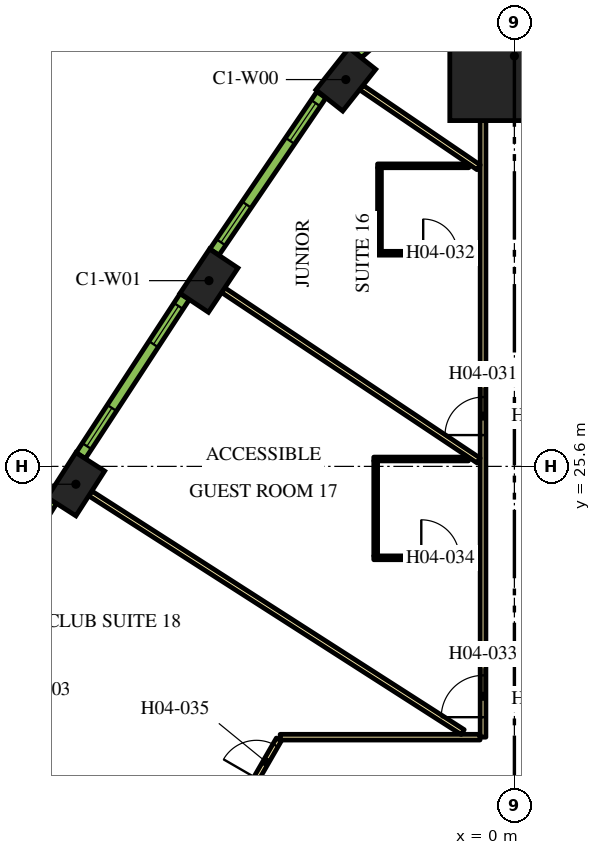
"""IFC4 building model, lengths in metres.
Left out: names, types, materials, properties, quantities, classifications, styles, units other than length and angle.
Written with IfcOpenShell. Run it as: python <this file> out.ifc"""

import sys

from ifc_helpers import new_model, si_unit, direction, frame, frame_2d, origin, origin_2d, place, context, subcontext, project, spatial, rectangle, extrude, element, fill, save


model = new_model("IFC4")
c1 = context("Model", 3, precision=1e-05, world=origin(), true_north=direction((0.0, 1.0)))
c2 = subcontext(c1, "Body", "Model", "MODEL_VIEW")
j1 = project(units=[si_unit("LENGTHUNIT", "METRE"), si_unit("PLANEANGLEUNIT", "RADIAN")], contexts=[c1])
p1 = place(None, origin())
s1 = spatial("IfcSite", under=j1, at=p1, CompositionType="ELEMENT")
p2 = place(p1, origin())
s2 = spatial("IfcBuilding", under=s1, at=p2, CompositionType="ELEMENT")
p3 = place(p2, frame((0.0, 0.0, 70.5)))
s3 = spatial("IfcBuildingStorey", under=s2, at=p3, CompositionType="ELEMENT", Elevation=70.5)
p4 = place(p3, frame((0.0, 36.399, 0.0), z_axis=(0.0, 0.0, 1.0), x_axis=(0.0, 1.0, 0.0)))
e1 = element("IfcColumn", 1, at=p4, inside=s3, PredefinedType="COLUMN", context=c2, shape_type="SweptSolid", body=[
    extrude(rectangle(XDim=3.4, YDim=3.4, at=origin_2d()), origin(), (0.0, 0.0, 1.0), 3.9),
])
for number, where, z_axis, x_axis in (
    (2, (-4.436, 35.778, 0.0), (0.0, 0.0, 1.0), (-0.62, -0.784, 0.0)),
    (3, (-8.037, 30.487, 0.0), (0.0, 0.0, 1.0), (-0.555, -0.832, 0.0)),
    (4, (-11.539, 25.131, 0.0), (0.0, 0.0, 1.0), (-0.539, -0.842, 0.0)),
):
    element("IfcColumn", number, at=place(p3, frame(where, z_axis=z_axis, x_axis=x_axis)), inside=s3, PredefinedType="COLUMN", context=c2, shape_type="SweptSolid", body=[
        extrude(rectangle(XDim=1.4, YDim=0.9, at=origin_2d()), origin(), (0.0, 0.0, 1.0), 3.9),
    ])
p5 = place(p3, frame((-0.825, 18.475, 0.0), z_axis=(0.0, 0.0, 1.0), x_axis=(0.0, 1.0, 0.0)))
e5 = element("IfcWall", 5, at=p5, inside=s3, PredefinedType="PARTITIONING", context=c2, shape_type="SweptSolid", body=[
    extrude(rectangle(XDim=16.224, YDim=0.15, at=frame_2d((8.112, 0.0))), origin(), (0.0, 0.0, 1.0), 2.75),
])
p6 = place(p5, frame((7.949, 0.0, 0.0)))
e6 = element("IfcOpeningElement", 6, at=p6, cuts=e5, PredefinedType="OPENING", context=c2, shape_type="SweptSolid", body=[
    extrude(rectangle(XDim=1.0, YDim=2.1, at=frame_2d((0.5, 1.05))), frame((0.0, 0.085, 0.0), z_axis=(0.0, -1.0, 0.0), x_axis=(1.0, 0.0, 0.0)), (0.0, 0.0, 1.0), 0.17),
])
p7 = place(p5, frame((0.526, 0.0, 0.0)))
e7 = element("IfcOpeningElement", 7, at=p7, cuts=e5, PredefinedType="OPENING", context=c2, shape_type="SweptSolid", body=[
    extrude(rectangle(XDim=1.1, YDim=2.1, at=frame_2d((0.55, 1.05))), frame((0.0, 0.085, 0.0), z_axis=(0.0, -1.0, 0.0), x_axis=(1.0, 0.0, 0.0)), (0.0, 0.0, 1.0), 0.17),
])
p8 = place(p3, frame((-6.163, 18.475, 0.0), z_axis=(0.0, 0.0, 1.0), x_axis=(1.0, 0.0, 0.0)))
e8 = element("IfcWall", 8, at=p8, inside=s3, PredefinedType="PARTITIONING", context=c2, shape_type="SweptSolid", body=[
    extrude(rectangle(XDim=5.258, YDim=0.15, at=frame_2d((2.629, 0.0))), origin(), (0.0, 0.0, 1.0), 2.75),
])
p9 = place(p3, frame((-19.081, -3.9, 0.0), z_axis=(0.0, 0.0, 1.0), x_axis=(0.499998313975, 0.866026377209, 0.0)))
e9 = element("IfcWall", 9, at=p9, inside=s3, PredefinedType="PARTITIONING", context=c2, shape_type="SweptSolid", body=[
    extrude(rectangle(XDim=25.766, YDim=0.15, at=frame_2d((12.883, 0.0))), origin(), (0.0, 0.0, 1.0), 2.75),
])
p10 = place(p9, frame((24.586, 0.0, 0.0)))
e10 = element("IfcOpeningElement", 10, at=p10, cuts=e9, PredefinedType="OPENING", context=c2, shape_type="SweptSolid", body=[
    extrude(rectangle(XDim=1.0, YDim=2.1, at=frame_2d((0.5, 1.05))), frame((0.0, 0.085, 0.0), z_axis=(0.0, -1.0, 0.0), x_axis=(1.0, 0.0, 0.0)), (0.0, 0.0, 1.0), 0.17),
])
p11 = place(p9, frame((9.948, 0.0, 0.0)))
e11 = element("IfcOpeningElement", 11, at=p11, cuts=e9, PredefinedType="OPENING", context=c2, shape_type="SweptSolid", body=[
    extrude(rectangle(XDim=1.0, YDim=2.1, at=frame_2d((0.5, 1.05))), frame((0.0, 0.085, 0.0), z_axis=(0.0, -1.0, 0.0), x_axis=(1.0, 0.0, 0.0)), (0.0, 0.0, 1.0), 0.17),
])
p12 = place(p9, frame((7.782, 0.0, 0.0)))
e12 = element("IfcOpeningElement", 12, at=p12, cuts=e9, PredefinedType="OPENING", context=c2, shape_type="SweptSolid", body=[
    extrude(rectangle(XDim=0.9, YDim=2.1, at=frame_2d((0.45, 1.05))), frame((0.0, 0.085, 0.0), z_axis=(0.0, -1.0, 0.0), x_axis=(1.0, 0.0, 0.0)), (0.0, 0.0, 1.0), 0.17),
])
p13 = place(p9, frame((4.658, 0.0, 0.0)))
e13 = element("IfcOpeningElement", 13, at=p13, cuts=e9, PredefinedType="OPENING", context=c2, shape_type="SweptSolid", body=[
    extrude(rectangle(XDim=0.9, YDim=2.1, at=frame_2d((0.45, 1.05))), frame((0.0, 0.085, 0.0), z_axis=(0.0, -1.0, 0.0), x_axis=(1.0, 0.0, 0.0)), (0.0, 0.0, 1.0), 0.17),
])
p14 = place(p3, frame((-11.16, 24.888, 0.0), z_axis=(0.0, 0.0, 1.0), x_axis=(0.84199813156, -0.539480441211, 0.0)))
e14 = element("IfcWall", 14, at=p14, inside=s3, PredefinedType="PARTITIONING", context=c2, shape_type="SweptSolid", body=[
    extrude(rectangle(XDim=11.638, YDim=0.15, at=frame_2d((5.819, 0.0))), origin(), (0.0, 0.0, 1.0), 2.75),
])
p15 = place(p3, frame((-7.662, 30.238, 0.0), z_axis=(0.0, 0.0, 1.0), x_axis=(0.831882886825, -0.554951225431, 0.0)))
e15 = element("IfcWall", 15, at=p15, inside=s3, PredefinedType="PARTITIONING", context=c2, shape_type="SweptSolid", body=[
    extrude(rectangle(XDim=8.079, YDim=0.15, at=frame_2d((4.04, 0.0))), origin(), (0.0, 0.0, 1.0), 2.75),
])
p16 = place(p3, frame((-4.028, 35.569, 0.0), z_axis=(0.0, 0.0, 1.0), x_axis=(0.826730622998, -0.562597971021, 0.0)))
e16 = element("IfcWall", 16, at=p16, inside=s3, PredefinedType="PARTITIONING", context=c2, shape_type="SweptSolid", body=[
    extrude(rectangle(XDim=3.733, YDim=0.15, at=frame_2d((1.867, 0.0))), origin(), (0.0, 0.0, 1.0), 2.75),
])
p17 = place(p3, frame((-3.6, 31.208, 0.0), z_axis=(0.0, 0.0, 1.0), x_axis=(1.0, 0.0, 0.0)))
e17 = element("IfcWall", 17, at=p17, inside=s3, PredefinedType="PARTITIONING", context=c2, shape_type="SweptSolid", body=[
    extrude(rectangle(XDim=2.7, YDim=0.1, at=frame_2d((1.35, 0.0))), origin(), (0.0, 0.0, 1.0), 2.75),
])
p18 = place(p17, frame((1.2, 0.0, 0.0)))
e18 = element("IfcOpeningElement", 18, at=p18, cuts=e17, PredefinedType="OPENING", context=c2, shape_type="SweptSolid", body=[
    extrude(rectangle(XDim=0.9, YDim=2.1, at=frame_2d((0.45, 1.05))), frame((0.0, 0.06, 0.0), z_axis=(0.0, -1.0, 0.0), x_axis=(1.0, 0.0, 0.0)), (0.0, 0.0, 1.0), 0.12),
])
p19 = place(p3, frame((-3.55, 31.259, 0.0), z_axis=(0.0, 0.0, 1.0), x_axis=(0.0, 1.0, 0.0)))
e19 = element("IfcWall", 19, at=p19, inside=s3, PredefinedType="PARTITIONING", context=c2, shape_type="SweptSolid", body=[
    extrude(rectangle(XDim=2.2, YDim=0.1, at=frame_2d((1.1, 0.0))), origin(), (0.0, 0.0, 1.0), 2.75),
])
p20 = place(p3, frame((-1.2, 33.509, 0.0), z_axis=(0.0, 0.0, 1.0), x_axis=(-1.0, 0.0, 0.0)))
e20 = element("IfcWall", 20, at=p20, inside=s3, PredefinedType="PARTITIONING", context=c2, shape_type="SweptSolid", body=[
    extrude(rectangle(XDim=2.4, YDim=0.1, at=frame_2d((1.2, 0.0))), origin(), (0.0, 0.0, 1.0), 2.75),
])
p21 = place(p3, frame((-3.7, 23.195, 0.0), z_axis=(0.0, 0.0, 1.0), x_axis=(1.0, 0.0, 0.0)))
e21 = element("IfcWall", 21, at=p21, inside=s3, PredefinedType="PARTITIONING", context=c2, shape_type="SweptSolid", body=[
    extrude(rectangle(XDim=2.8, YDim=0.1, at=frame_2d((1.4, 0.0))), origin(), (0.0, 0.0, 1.0), 2.75),
])
p22 = place(p21, frame((1.25, 0.0, 0.0)))
e22 = element("IfcOpeningElement", 22, at=p22, cuts=e21, PredefinedType="OPENING", context=c2, shape_type="SweptSolid", body=[
    extrude(rectangle(XDim=1.0, YDim=2.1, at=frame_2d((0.5, 1.05))), frame((0.0, 0.06, 0.0), z_axis=(0.0, -1.0, 0.0), x_axis=(1.0, 0.0, 0.0)), (0.0, 0.0, 1.0), 0.12),
])
p23 = place(p3, frame((-3.65, 23.245, 0.0), z_axis=(0.0, 0.0, 1.0), x_axis=(0.0, 1.0, 0.0)))
e23 = element("IfcWall", 23, at=p23, inside=s3, PredefinedType="PARTITIONING", context=c2, shape_type="SweptSolid", body=[
    extrude(rectangle(XDim=2.5, YDim=0.1, at=frame_2d((1.25, 0.0))), origin(), (0.0, 0.0, 1.0), 2.75),
])
p24 = place(p3, frame((-1.21, 25.795, 0.0), z_axis=(0.0, 0.0, 1.0), x_axis=(-1.0, 0.0, 0.0)))
e24 = element("IfcWall", 24, at=p24, inside=s3, PredefinedType="PARTITIONING", context=c2, shape_type="SweptSolid", body=[
    extrude(rectangle(XDim=2.49, YDim=0.1, at=frame_2d((1.245, 0.0))), origin(), (0.0, 0.0, 1.0), 2.75),
])
p25 = place(p3, frame((-3.064, 37.395, 0.0), z_axis=(0.0, 0.0, 1.0), x_axis=(-0.749812680302, -0.661650167731, 0.0)))
e25 = element("IfcWall", 25, at=p25, inside=s3, PredefinedType="SOLIDWALL", context=c2, shape_type="SweptSolid", body=[
    extrude(rectangle(XDim=1.415, YDim=0.29, at=frame_2d((0.708, 0.0))), origin(), (0.0, 0.0, 1.0), 3.65),
])
p26 = place(p25, frame((0.258, 0.0, 0.9)))
e26 = element("IfcOpeningElement", 26, at=p26, cuts=e25, PredefinedType="OPENING", context=c2, shape_type="SweptSolid", body=[
    extrude(rectangle(XDim=0.9, YDim=2.15, at=frame_2d((0.45, 1.075))), frame((0.0, 0.155, 0.0), z_axis=(0.0, -1.0, 0.0), x_axis=(1.0, 0.0, 0.0)), (0.0, 0.0, 1.0), 0.31),
])
p27 = place(p3, frame((-5.078, 35.376, 0.0), z_axis=(0.0, 0.0, 1.0), x_axis=(-0.562610153679, -0.826722332454, 0.0)))
e27 = element("IfcWall", 27, at=p27, inside=s3, PredefinedType="SOLIDWALL", context=c2, shape_type="SweptSolid", body=[
    extrude(rectangle(XDim=5.006, YDim=0.29, at=frame_2d((2.503, 0.0))), origin(), (0.0, 0.0, 1.0), 3.65),
])
p28 = place(p27, frame((0.265, 0.0, 0.9)))
e28 = element("IfcOpeningElement", 28, at=p28, cuts=e27, PredefinedType="OPENING", context=c2, shape_type="SweptSolid", body=[
    extrude(rectangle(XDim=1.2, YDim=2.15, at=frame_2d((0.6, 1.075))), frame((0.0, 0.155, 0.0), z_axis=(0.0, -1.0, 0.0), x_axis=(1.0, 0.0, 0.0)), (0.0, 0.0, 1.0), 0.31),
])
p29 = place(p27, frame((3.495, 0.0, 0.9)))
e29 = element("IfcOpeningElement", 29, at=p29, cuts=e27, PredefinedType="OPENING", context=c2, shape_type="SweptSolid", body=[
    extrude(rectangle(XDim=1.2, YDim=2.15, at=frame_2d((0.6, 1.075))), frame((0.0, 0.155, 0.0), z_axis=(0.0, -1.0, 0.0), x_axis=(1.0, 0.0, 0.0)), (0.0, 0.0, 1.0), 0.31),
])
p30 = place(p3, frame((-8.676, 30.068, 0.0), z_axis=(0.0, 0.0, 1.0), x_axis=(-0.547204617628, -0.836998868845, 0.0)))
e30 = element("IfcWall", 30, at=p30, inside=s3, PredefinedType="SOLIDWALL", context=c2, shape_type="SweptSolid", body=[
    extrude(rectangle(XDim=4.998, YDim=0.29, at=frame_2d((2.499, 0.0))), origin(), (0.0, 0.0, 1.0), 3.65),
])
p31 = place(p30, frame((0.297, 0.0, 0.9)))
e31 = element("IfcOpeningElement", 31, at=p31, cuts=e30, PredefinedType="OPENING", context=c2, shape_type="SweptSolid", body=[
    extrude(rectangle(XDim=1.2, YDim=2.15, at=frame_2d((0.6, 1.075))), frame((0.0, 0.155, 0.0), z_axis=(0.0, -1.0, 0.0), x_axis=(1.0, 0.0, 0.0)), (0.0, 0.0, 1.0), 0.31),
])
p32 = place(p30, frame((3.501, 0.0, 0.9)))
e32 = element("IfcOpeningElement", 32, at=p32, cuts=e30, PredefinedType="OPENING", context=c2, shape_type="SweptSolid", body=[
    extrude(rectangle(XDim=1.2, YDim=2.15, at=frame_2d((0.6, 1.075))), frame((0.0, 0.155, 0.0), z_axis=(0.0, -1.0, 0.0), x_axis=(1.0, 0.0, 0.0)), (0.0, 0.0, 1.0), 0.31),
])
p33 = place(p3, frame((-12.17, 24.699, 0.0), z_axis=(0.0, 0.0, 1.0), x_axis=(-0.531688286542, -0.846940119462, 0.0)))
e33 = element("IfcWall", 33, at=p33, inside=s3, PredefinedType="SOLIDWALL", context=c2, shape_type="SweptSolid", body=[
    extrude(rectangle(XDim=4.998, YDim=0.29, at=frame_2d((2.499, 0.0))), origin(), (0.0, 0.0, 1.0), 3.65),
])
p34 = place(p33, frame((0.297, 0.0, 0.9)))
e34 = element("IfcOpeningElement", 34, at=p34, cuts=e33, PredefinedType="OPENING", context=c2, shape_type="SweptSolid", body=[
    extrude(rectangle(XDim=1.2, YDim=2.15, at=frame_2d((0.6, 1.075))), frame((0.0, 0.155, 0.0), z_axis=(0.0, -1.0, 0.0), x_axis=(1.0, 0.0, 0.0)), (0.0, 0.0, 1.0), 0.31),
])
p35 = place(p33, frame((3.501, 0.0, 0.9)))
e35 = element("IfcOpeningElement", 35, at=p35, cuts=e33, PredefinedType="OPENING", context=c2, shape_type="SweptSolid", body=[
    extrude(rectangle(XDim=1.2, YDim=2.15, at=frame_2d((0.6, 1.075))), frame((0.0, 0.155, 0.0), z_axis=(0.0, -1.0, 0.0), x_axis=(1.0, 0.0, 0.0)), (0.0, 0.0, 1.0), 0.31),
])
p36 = place(p6, origin())
e36 = element("IfcDoor", 36, at=p36, inside=s3, OperationType="SINGLE_SWING_LEFT", PredefinedType="DOOR", context=c2, shape_type="SweptSolid", body=[
    extrude(rectangle(XDim=1.0, YDim=2.1, at=frame_2d((0.5, 1.05))), frame((0.0, 0.025, 0.0), z_axis=(0.0, -1.0, 0.0), x_axis=(1.0, 0.0, 0.0)), (0.0, 0.0, 1.0), 0.05),
])
fill(e6, e36)
p37 = place(p18, origin())
e37 = element("IfcDoor", 37, at=p37, inside=s3, OperationType="SINGLE_SWING_LEFT", PredefinedType="DOOR", context=c2, shape_type="SweptSolid", body=[
    extrude(rectangle(XDim=0.9, YDim=2.1, at=frame_2d((0.45, 1.05))), frame((0.0, 0.025, 0.0), z_axis=(0.0, -1.0, 0.0), x_axis=(1.0, 0.0, 0.0)), (0.0, 0.0, 1.0), 0.05),
])
fill(e18, e37)
p38 = place(p7, origin())
e38 = element("IfcDoor", 38, at=p38, inside=s3, OperationType="SINGLE_SWING_LEFT", PredefinedType="DOOR", context=c2, shape_type="SweptSolid", body=[
    extrude(rectangle(XDim=1.1, YDim=2.1, at=frame_2d((0.55, 1.05))), frame((0.0, 0.025, 0.0), z_axis=(0.0, -1.0, 0.0), x_axis=(1.0, 0.0, 0.0)), (0.0, 0.0, 1.0), 0.05),
])
fill(e7, e38)
p39 = place(p22, origin())
e39 = element("IfcDoor", 39, at=p39, inside=s3, OperationType="SINGLE_SWING_LEFT", PredefinedType="DOOR", context=c2, shape_type="SweptSolid", body=[
    extrude(rectangle(XDim=1.0, YDim=2.1, at=frame_2d((0.5, 1.05))), frame((0.0, 0.025, 0.0), z_axis=(0.0, -1.0, 0.0), x_axis=(1.0, 0.0, 0.0)), (0.0, 0.0, 1.0), 0.05),
])
fill(e22, e39)
p40 = place(p10, origin())
e40 = element("IfcDoor", 40, at=p40, inside=s3, OperationType="SINGLE_SWING_RIGHT", PredefinedType="DOOR", context=c2, shape_type="SweptSolid", body=[
    extrude(rectangle(XDim=1.0, YDim=2.1, at=frame_2d((0.5, 1.05))), frame((0.0, 0.025, 0.0), z_axis=(0.0, -1.0, 0.0), x_axis=(1.0, 0.0, 0.0)), (0.0, 0.0, 1.0), 0.05),
])
fill(e10, e40)
p41 = place(p28, origin())
e41 = element("IfcWindow", 41, at=p41, inside=s3, PartitioningType="DOUBLE_PANEL_VERTICAL", PredefinedType="WINDOW", context=c2, shape_type="SweptSolid", body=[
    extrude(rectangle(XDim=1.2, YDim=2.15, at=frame_2d((0.6, 1.075))), frame((0.0, 0.015, 0.0), z_axis=(0.0, -1.0, 0.0), x_axis=(1.0, 0.0, 0.0)), (0.0, 0.0, 1.0), 0.06),
])
fill(e28, e41)
p42 = place(p29, origin())
e42 = element("IfcWindow", 42, at=p42, inside=s3, PartitioningType="DOUBLE_PANEL_VERTICAL", PredefinedType="WINDOW", context=c2, shape_type="SweptSolid", body=[
    extrude(rectangle(XDim=1.2, YDim=2.15, at=frame_2d((0.6, 1.075))), frame((0.0, 0.015, 0.0), z_axis=(0.0, -1.0, 0.0), x_axis=(1.0, 0.0, 0.0)), (0.0, 0.0, 1.0), 0.06),
])
fill(e29, e42)
p43 = place(p31, origin())
e43 = element("IfcWindow", 43, at=p43, inside=s3, PartitioningType="DOUBLE_PANEL_VERTICAL", PredefinedType="WINDOW", context=c2, shape_type="SweptSolid", body=[
    extrude(rectangle(XDim=1.2, YDim=2.15, at=frame_2d((0.6, 1.075))), frame((0.0, 0.015, 0.0), z_axis=(0.0, -1.0, 0.0), x_axis=(1.0, 0.0, 0.0)), (0.0, 0.0, 1.0), 0.06),
])
fill(e31, e43)
p44 = place(p32, origin())
e44 = element("IfcWindow", 44, at=p44, inside=s3, PartitioningType="DOUBLE_PANEL_VERTICAL", PredefinedType="WINDOW", context=c2, shape_type="SweptSolid", body=[
    extrude(rectangle(XDim=1.2, YDim=2.15, at=frame_2d((0.6, 1.075))), frame((0.0, 0.015, 0.0), z_axis=(0.0, -1.0, 0.0), x_axis=(1.0, 0.0, 0.0)), (0.0, 0.0, 1.0), 0.06),
])
fill(e32, e44)
save(model, sys.argv[1])
